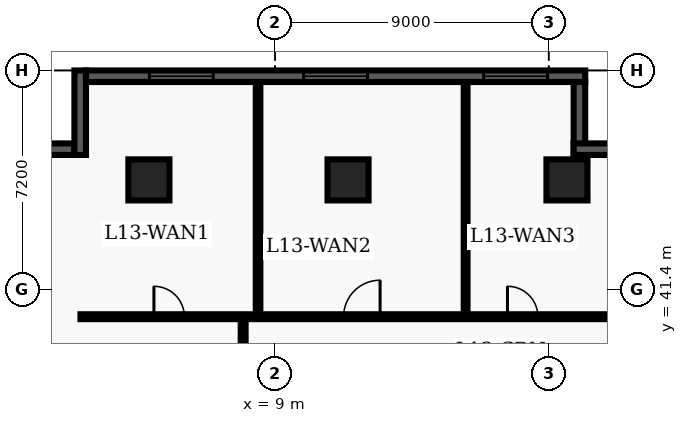
"""IFC4 building model, lengths in metres.
Left out: names, types, materials, properties, quantities, classifications, styles, units other than length and angle.
Written with IfcOpenShell. Run it as: python <this file> out.ifc"""

import sys

from ifc_helpers import new_model, entity, si_unit, converted_unit, direction, frame, origin_with_axes, origin_2d_with_axis, place, context, subcontext, project, spatial, polyline, rectangle, outline, extrude, element, fill, save


model = new_model("IFC4")
c1 = context("Model", 3, precision=1e-05, world=origin_with_axes(), true_north=direction((0.0, 1.0)))
c2 = subcontext(c1, "Body", "Model", "MODEL_VIEW")
j1 = project(units=[si_unit("LENGTHUNIT", "METRE"), converted_unit("PLANEANGLEUNIT", "DEGREE", entity("IfcPlaneAngleMeasure", 0.017), si_unit("PLANEANGLEUNIT", "RADIAN"), dimensions=[0, 0, 0, 0, 0, 0, 0])], contexts=[c1])
p1 = place(None, origin_with_axes())
s1 = spatial("IfcSite", under=j1, at=p1, CompositionType="ELEMENT")
p2 = place(p1, origin_with_axes())
s2 = spatial("IfcBuilding", under=s1, at=p2, CompositionType="ELEMENT")
p3 = place(p2, frame((0.0, 0.0, 56.1), z_axis=(0.0, 0.0, 1.0), x_axis=(1.0, 0.0, 0.0)))
s3 = spatial("IfcBuildingStorey", under=s2, at=p3, CompositionType="ELEMENT", Elevation=56.1)
for number, where, z_axis, x_axis in (
    (1, (11.4, 45.0, 0.0), (0.0, 0.0, 1.0), (1.0, 0.0, 0.0)),
    (2, (18.6, 45.0, 0.0), (0.0, 0.0, 1.0), (1.0, 0.0, 0.0)),
    (3, (4.85, 45.0, 0.0), (0.0, 0.0, 1.0), (1.0, 0.0, 0.0)),
):
    element("IfcColumn", number, at=place(p3, frame(where, z_axis=z_axis, x_axis=x_axis)), inside=s3, PredefinedType="COLUMN", context=c2, shape_type="SweptSolid", body=[
        extrude(rectangle(XDim=1.35, YDim=1.35, at=origin_2d_with_axis()), origin_with_axes(), (0.0, 0.0, 1.0), 3.9),
    ])
p4 = place(p3, frame((2.6, 40.5, 0.0), z_axis=(0.0, 0.0, 1.0), x_axis=(1.0, 0.0, 0.0)))
e4 = element("IfcWall", 4, at=p4, inside=s3, PredefinedType="PARTITIONING", context=c2, shape_type="SweptSolid", body=[
    extrude(outline(polyline([(0.0, -0.08), (18.65, -0.08), (18.65, 0.08), (0.0, 0.08), (0.0, -0.08)])), origin_with_axes(), (0.0, 0.0, 1.0), 2.7),
])
p5 = place(p4, frame((2.915, 0.0, 0.0), z_axis=(0.0, 0.0, 1.0), x_axis=(1.0, 0.0, 0.0)))
e5 = element("IfcOpeningElement", 5, at=p5, cuts=e4, PredefinedType="OPENING", context=c2, shape_type="SweptSolid", body=[
    extrude(rectangle(XDim=1.0, YDim=0.18, at=origin_2d_with_axis()), origin_with_axes(), (0.0, 0.0, 1.0), 2.15),
])
p6 = place(p4, frame((9.254, 0.0, 0.0), z_axis=(0.0, 0.0, 1.0), x_axis=(1.0, 0.0, 0.0)))
e6 = element("IfcOpeningElement", 6, at=p6, cuts=e4, PredefinedType="OPENING", context=c2, shape_type="SweptSolid", body=[
    extrude(rectangle(XDim=1.2, YDim=0.18, at=origin_2d_with_axis()), origin_with_axes(), (0.0, 0.0, 1.0), 2.2),
])
p7 = place(p4, frame((14.543, 0.0, 0.0), z_axis=(0.0, 0.0, 1.0), x_axis=(1.0, 0.0, 0.0)))
e7 = element("IfcOpeningElement", 7, at=p7, cuts=e4, PredefinedType="OPENING", context=c2, shape_type="SweptSolid", body=[
    extrude(rectangle(XDim=1.0, YDim=0.18, at=origin_2d_with_axis()), origin_with_axes(), (0.0, 0.0, 1.0), 2.15),
])
p8 = place(p3, frame((7.95, 7.8, 0.0), z_axis=(0.0, 0.0, 1.0), x_axis=(0.0, 1.0, 0.0)))
e8 = element("IfcWall", 8, at=p8, inside=s3, PredefinedType="PARTITIONING", context=c2, shape_type="SweptSolid", body=[
    extrude(outline(polyline([(0.0, -0.08), (32.7, -0.08), (32.7, 0.08), (0.0, 0.08), (0.0, -0.08)])), origin_with_axes(), (0.0, 0.0, 1.0), 2.7),
])
p9 = place(p8, frame((3.166, 0.0, 0.0), z_axis=(0.0, 0.0, 1.0), x_axis=(1.0, 0.0, 0.0)))
e9 = element("IfcOpeningElement", 9, at=p9, cuts=e8, PredefinedType="OPENING", context=c2, shape_type="SweptSolid", body=[
    extrude(rectangle(XDim=1.0, YDim=0.18, at=origin_2d_with_axis()), origin_with_axes(), (0.0, 0.0, 1.0), 2.15),
])
p10 = place(p8, frame((9.986, 0.0, 0.0), z_axis=(0.0, 0.0, 1.0), x_axis=(1.0, 0.0, 0.0)))
e10 = element("IfcOpeningElement", 10, at=p10, cuts=e8, PredefinedType="OPENING", context=c2, shape_type="SweptSolid", body=[
    extrude(rectangle(XDim=1.0, YDim=0.18, at=origin_2d_with_axis()), origin_with_axes(), (0.0, 0.0, 1.0), 2.15),
])
p11 = place(p8, frame((18.332, 0.0, 0.0), z_axis=(0.0, 0.0, 1.0), x_axis=(1.0, 0.0, 0.0)))
e11 = element("IfcOpeningElement", 11, at=p11, cuts=e8, PredefinedType="OPENING", context=c2, shape_type="SweptSolid", body=[
    extrude(rectangle(XDim=1.0, YDim=0.18, at=origin_2d_with_axis()), origin_with_axes(), (0.0, 0.0, 1.0), 2.15),
])
p12 = place(p8, frame((25.088, 0.0, 0.0), z_axis=(0.0, 0.0, 1.0), x_axis=(1.0, 0.0, 0.0)))
e12 = element("IfcOpeningElement", 12, at=p12, cuts=e8, PredefinedType="OPENING", context=c2, shape_type="SweptSolid", body=[
    extrude(rectangle(XDim=1.0, YDim=0.18, at=origin_2d_with_axis()), origin_with_axes(), (0.0, 0.0, 1.0), 2.15),
])
p13 = place(p8, frame((29.927, 0.0, 0.0), z_axis=(0.0, 0.0, 1.0), x_axis=(1.0, 0.0, 0.0)))
e13 = element("IfcOpeningElement", 13, at=p13, cuts=e8, PredefinedType="OPENING", context=c2, shape_type="SweptSolid", body=[
    extrude(rectangle(XDim=1.0, YDim=0.18, at=origin_2d_with_axis()), origin_with_axes(), (0.0, 0.0, 1.0), 2.15),
])
p14 = place(p3, frame((8.44, 40.6, 0.0), z_axis=(0.0, 0.0, 1.0), x_axis=(0.0, 1.0, 0.0)))
e14 = element("IfcWall", 14, at=p14, inside=s3, PredefinedType="PARTITIONING", context=c2, shape_type="SweptSolid", body=[
    extrude(outline(polyline([(0.0, -0.075), (7.64, -0.075), (7.64, 0.075), (0.0, 0.075), (0.0, -0.075)])), origin_with_axes(), (0.0, 0.0, 1.0), 2.7),
])
p15 = place(p3, frame((15.267, 40.6, 0.0), z_axis=(0.0, 0.0, 1.0), x_axis=(0.0, 1.0, 0.0)))
e15 = element("IfcWall", 15, at=p15, inside=s3, PredefinedType="PARTITIONING", context=c2, shape_type="SweptSolid", body=[
    extrude(outline(polyline([(0.0, -0.062), (7.64, -0.062), (7.64, 0.062), (0.0, 0.062), (0.0, -0.062)])), origin_with_axes(), (0.0, 0.0, 1.0), 2.7),
])
p16 = place(p3, frame((0.38, 46.01, 0.0), z_axis=(0.0, 0.0, 1.0), x_axis=(1.0, 0.0, 0.0)))
e16 = element("IfcWall", 16, at=p16, inside=s3, PredefinedType="SOLIDWALL", context=c2, shape_type="SweptSolid", body=[
    extrude(outline(polyline([(0.0, -0.19), (2.02, -0.19), (2.02, 0.19), (0.0, 0.19), (0.0, -0.19)])), origin_with_axes(), (0.0, 0.0, 1.0), 3.66),
])
p17 = place(p3, frame((2.59, 45.82, 0.0), z_axis=(0.0, 0.0, 1.0), x_axis=(0.0, 1.0, 0.0)))
e17 = element("IfcWall", 17, at=p17, inside=s3, PredefinedType="SOLIDWALL", context=c2, shape_type="SweptSolid", body=[
    extrude(outline(polyline([(0.0, -0.19), (2.78, -0.19), (2.78, 0.19), (0.0, 0.19), (0.0, -0.19)])), origin_with_axes(), (0.0, 0.0, 1.0), 3.66),
])
p18 = place(p3, frame((2.78, 48.41, 0.0), z_axis=(0.0, 0.0, 1.0), x_axis=(1.0, 0.0, 0.0)))
e18 = element("IfcWall", 18, at=p18, inside=s3, PredefinedType="SOLIDWALL", context=c2, shape_type="SweptSolid", body=[
    extrude(outline(polyline([(0.0, -0.19), (16.42, -0.19), (16.42, 0.19), (0.0, 0.19), (0.0, -0.19)])), origin_with_axes(), (0.0, 0.0, 1.0), 3.66),
])
p19 = place(p18, frame((3.137, 0.0, 0.45), z_axis=(0.0, 0.0, 1.0), x_axis=(1.0, 0.0, 0.0)))
e19 = element("IfcOpeningElement", 19, at=p19, cuts=e18, PredefinedType="OPENING", context=c2, shape_type="SweptSolid", body=[
    extrude(rectangle(XDim=2.1, YDim=0.4, at=origin_2d_with_axis()), origin_with_axes(), (0.0, 0.0, 1.0), 2.2),
])
p20 = place(p18, frame((8.21, 0.0, 0.45), z_axis=(0.0, 0.0, 1.0), x_axis=(1.0, 0.0, 0.0)))
e20 = element("IfcOpeningElement", 20, at=p20, cuts=e18, PredefinedType="OPENING", context=c2, shape_type="SweptSolid", body=[
    extrude(rectangle(XDim=2.1, YDim=0.4, at=origin_2d_with_axis()), origin_with_axes(), (0.0, 0.0, 1.0), 2.2),
])
p21 = place(p18, frame((14.133, 0.0, 0.45), z_axis=(0.0, 0.0, 1.0), x_axis=(1.0, 0.0, 0.0)))
e21 = element("IfcOpeningElement", 21, at=p21, cuts=e18, PredefinedType="OPENING", context=c2, shape_type="SweptSolid", body=[
    extrude(rectangle(XDim=2.1, YDim=0.4, at=origin_2d_with_axis()), origin_with_axes(), (0.0, 0.0, 1.0), 2.2),
])
p22 = place(p3, frame((19.01, 48.22, 0.0), z_axis=(0.0, 0.0, 1.0), x_axis=(0.0, -1.0, 0.0)))
e22 = element("IfcWall", 22, at=p22, inside=s3, PredefinedType="SOLIDWALL", context=c2, shape_type="SweptSolid", body=[
    extrude(outline(polyline([(0.0, -0.19), (2.56, -0.19), (2.56, 0.19), (0.0, 0.19), (0.0, -0.19)])), origin_with_axes(), (0.0, 0.0, 1.0), 3.66),
])
p23 = place(p3, frame((18.82, 46.01, 0.0), z_axis=(0.0, 0.0, 1.0), x_axis=(1.0, 0.0, 0.0)))
e23 = element("IfcWall", 23, at=p23, inside=s3, PredefinedType="SOLIDWALL", context=c2, shape_type="SweptSolid", body=[
    extrude(outline(polyline([(0.0, -0.19), (2.78, -0.19), (2.78, 0.19), (0.0, 0.19), (0.0, -0.19)])), origin_with_axes(), (0.0, 0.0, 1.0), 3.66),
])
p24 = place(p4, frame((2.915, 0.0, 0.0), z_axis=(0.0, 0.0, 1.0), x_axis=(1.0, 0.0, 0.0)))
e24 = element("IfcDoor", 24, at=p24, inside=s3, OperationType="SINGLE_SWING_LEFT", PredefinedType="DOOR", context=c2, shape_type="SweptSolid", body=[
    extrude(rectangle(XDim=1.0, YDim=0.09, at=origin_2d_with_axis()), origin_with_axes(), (0.0, 0.0, 1.0), 2.15),
])
fill(e5, e24)
p25 = place(p4, frame((9.254, 0.0, 0.0), z_axis=(0.0, 0.0, 1.0), x_axis=(1.0, 0.0, 0.0)))
e25 = element("IfcDoor", 25, at=p25, inside=s3, OperationType="SINGLE_SWING_RIGHT", PredefinedType="DOOR", context=c2, shape_type="SweptSolid", body=[
    extrude(rectangle(XDim=1.2, YDim=0.09, at=origin_2d_with_axis()), origin_with_axes(), (0.0, 0.0, 1.0), 2.2),
])
fill(e6, e25)
p26 = place(p4, frame((14.543, 0.0, 0.0), z_axis=(0.0, 0.0, 1.0), x_axis=(1.0, 0.0, 0.0)))
e26 = element("IfcDoor", 26, at=p26, inside=s3, OperationType="SINGLE_SWING_LEFT", PredefinedType="DOOR", context=c2, shape_type="SweptSolid", body=[
    extrude(rectangle(XDim=1.0, YDim=0.09, at=origin_2d_with_axis()), origin_with_axes(), (0.0, 0.0, 1.0), 2.15),
])
fill(e7, e26)
p27 = place(p18, frame((3.137, 0.0, 0.45), z_axis=(0.0, 0.0, 1.0), x_axis=(1.0, 0.0, 0.0)))
e27 = element("IfcWindow", 27, at=p27, inside=s3, PredefinedType="WINDOW", context=c2, shape_type="SweptSolid", body=[
    extrude(rectangle(XDim=2.1, YDim=0.09, at=origin_2d_with_axis()), origin_with_axes(), (0.0, 0.0, 1.0), 2.2),
])
fill(e19, e27)
p28 = place(p18, frame((8.21, 0.0, 0.45), z_axis=(0.0, 0.0, 1.0), x_axis=(1.0, 0.0, 0.0)))
e28 = element("IfcWindow", 28, at=p28, inside=s3, PredefinedType="WINDOW", context=c2, shape_type="SweptSolid", body=[
    extrude(rectangle(XDim=2.1, YDim=0.09, at=origin_2d_with_axis()), origin_with_axes(), (0.0, 0.0, 1.0), 2.2),
])
fill(e20, e28)
p29 = place(p18, frame((14.133, 0.0, 0.45), z_axis=(0.0, 0.0, 1.0), x_axis=(1.0, 0.0, 0.0)))
e29 = element("IfcWindow", 29, at=p29, inside=s3, PredefinedType="WINDOW", context=c2, shape_type="SweptSolid", body=[
    extrude(rectangle(XDim=2.1, YDim=0.09, at=origin_2d_with_axis()), origin_with_axes(), (0.0, 0.0, 1.0), 2.2),
])
fill(e21, e29)
save(model, sys.argv[1])
